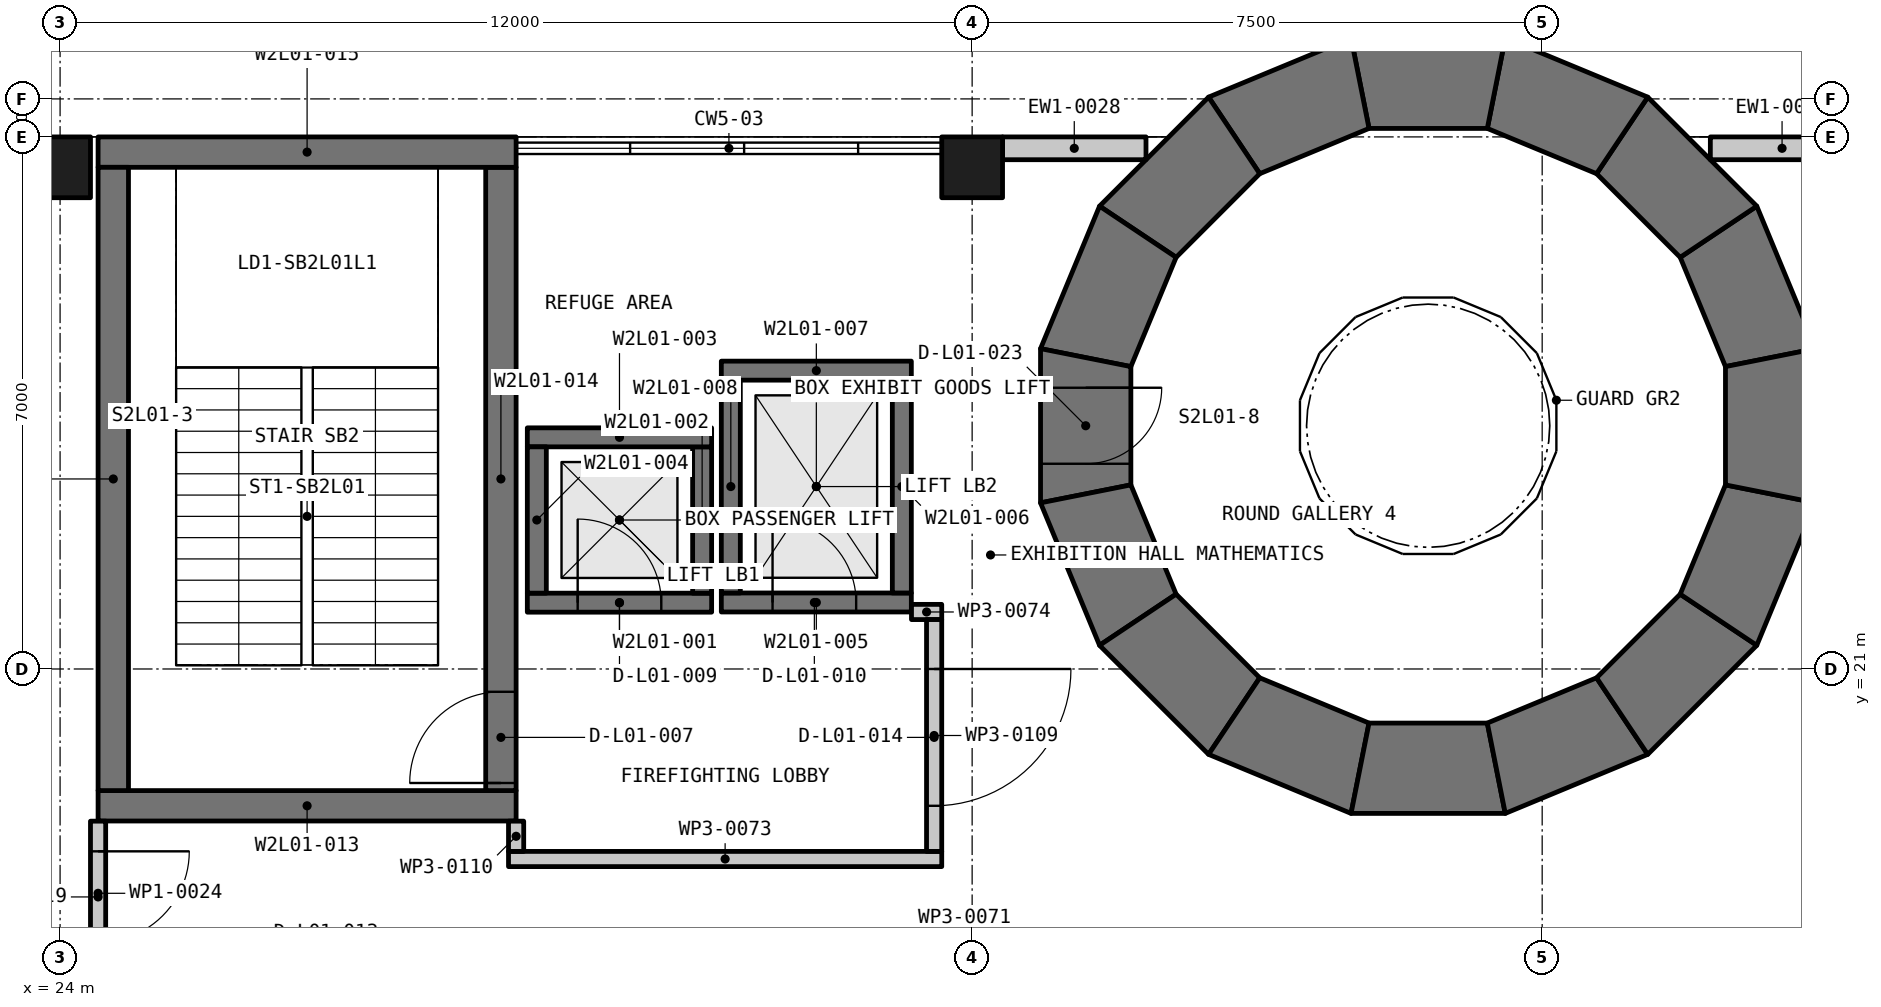
"""IFC4 building model, lengths in metres.
Left out: names, types, materials, properties, quantities, classifications, styles, units other than length and angle.
Written with IfcOpenShell. Run it as: python <this file> out.ifc"""

import sys

from ifc_helpers import new_model, si_unit, direction, frame, frame_2d, origin, origin_2d, place, context, subcontext, project, spatial, polyline, rectangle, outline, extrude, element, fill, save


model = new_model("IFC4")
c1 = context("Model", 3, precision=1e-05, world=origin(), true_north=direction((0.0, 1.0)))
c2 = subcontext(c1, "Body", "Model", "MODEL_VIEW")
j1 = project(units=[si_unit("LENGTHUNIT", "METRE"), si_unit("PLANEANGLEUNIT", "RADIAN")], contexts=[c1])
p1 = place(None, origin())
s1 = spatial("IfcSite", under=j1, at=p1, CompositionType="ELEMENT")
p2 = place(p1, origin())
s2 = spatial("IfcBuilding", under=s1, at=p2, CompositionType="ELEMENT")
p3 = place(p2, frame((0.0, 0.0, 6.0)))
s3 = spatial("IfcBuildingStorey", under=s2, at=p3, CompositionType="ELEMENT", Elevation=6.0)
for number, where, z_axis, x_axis in (
    (1, (24.0, 27.6, -0.3), (0.0, 0.0, 1.0), (1.0, 0.0, 0.0)),
    (2, (36.0, 27.6, -0.3), (0.0, 0.0, 1.0), (1.0, 0.0, 0.0)),
):
    element("IfcColumn", number, at=place(p3, frame(where, z_axis=z_axis, x_axis=x_axis)), inside=s3, PredefinedType="COLUMN", context=c2, shape_type="SweptSolid", body=[
        extrude(rectangle(XDim=0.8, YDim=0.8, at=origin_2d()), origin(), (0.0, 0.0, 1.0), 5.25),
    ])
p4 = place(p3, frame((46.551, 24.987, -0.3), z_axis=(0.0, 0.0, 1.0), x_axis=(-0.382649360562, 0.923893644778, 0.0)))
e3 = element("IfcWall", 3, at=p4, inside=s3, PredefinedType="SHEAR", context=c2, shape_type="SweptSolid", body=[
    extrude(outline(polyline([(0.0, -0.594), (2.029, -0.594), (1.792, 0.594), (0.236, 0.594), (0.0, -0.594)])), origin(), (0.0, 0.0, 1.0), 5.25),
])
p5 = place(p3, frame((45.904, 26.669, -0.3), z_axis=(0.0, 0.0, 1.0), x_axis=(-0.707106781187, 0.707106781187, 0.0)))
e4 = element("IfcWall", 4, at=p5, inside=s3, PredefinedType="SHEAR", context=c2, shape_type="SweptSolid", body=[
    extrude(outline(polyline([(0.0, -0.594), (2.029, -0.594), (1.793, 0.594), (0.237, 0.594), (0.0, -0.594)])), origin(), (0.0, 0.0, 1.0), 5.25),
])
p6 = place(p3, frame((44.662, 27.975, -0.3), z_axis=(0.0, 0.0, 1.0), x_axis=(-0.923893644778, 0.382649360562, 0.0)))
e5 = element("IfcWall", 5, at=p6, inside=s3, PredefinedType="SHEAR", context=c2, shape_type="SweptSolid", body=[
    extrude(outline(polyline([(0.0, -0.594), (2.029, -0.594), (1.793, 0.594), (0.236, 0.594), (0.0, -0.594)])), origin(), (0.0, 0.0, 1.0), 5.25),
])
for number, where, z_axis, x_axis in (
    (6, (43.014, 28.706, -0.3), (0.0, 0.0, 1.0), (-1.0, 0.0, 0.0)),
    (7, (41.213, 28.751, -0.3), (0.0, 0.0, 1.0), (-0.924, -0.383, 0.0)),
):
    element("IfcWall", number, at=place(p3, frame(where, z_axis=z_axis, x_axis=x_axis)), inside=s3, PredefinedType="SHEAR", context=c2, shape_type="SweptSolid", body=[
        extrude(outline(polyline([(0.0, -0.594), (2.029, -0.594), (1.792, 0.594), (0.236, 0.594), (0.0, -0.594)])), origin(), (0.0, 0.0, 1.0), 5.25),
    ])
p7 = place(p3, frame((39.531, 28.104, -0.3), z_axis=(0.0, 0.0, 1.0), x_axis=(-0.707106781187, -0.707106781187, 0.0)))
e8 = element("IfcWall", 8, at=p7, inside=s3, PredefinedType="SHEAR", context=c2, shape_type="SweptSolid", body=[
    extrude(outline(polyline([(0.0, -0.594), (2.029, -0.594), (1.793, 0.594), (0.237, 0.594), (0.0, -0.594)])), origin(), (0.0, 0.0, 1.0), 5.25),
])
p8 = place(p3, frame((38.225, 26.862, -0.3), z_axis=(0.0, 0.0, 1.0), x_axis=(-0.382649360562, -0.923893644778, 0.0)))
e9 = element("IfcWall", 9, at=p8, inside=s3, PredefinedType="SHEAR", context=c2, shape_type="SweptSolid", body=[
    extrude(outline(polyline([(-0.0, -0.594), (2.029, -0.594), (1.793, 0.594), (0.236, 0.594), (-0.0, -0.594)])), origin(), (0.0, 0.0, 1.0), 5.25),
])
p9 = place(p3, frame((37.494, 25.214, -0.3), z_axis=(0.0, 0.0, 1.0), x_axis=(0.0, -1.0, 0.0)))
e10 = element("IfcWall", 10, at=p9, inside=s3, PredefinedType="SHEAR", context=c2, shape_type="SweptSolid", body=[
    extrude(outline(polyline([(-0.0, -0.594), (2.029, -0.594), (1.792, 0.594), (0.236, 0.594), (-0.0, -0.594)])), origin(), (0.0, 0.0, 1.0), 5.25),
])
p10 = place(p9, frame((0.514, 0.0, 0.3)))
e11 = element("IfcOpeningElement", 11, at=p10, cuts=e10, PredefinedType="OPENING", context=c2, shape_type="SweptSolid", body=[
    extrude(rectangle(XDim=1.0, YDim=2.2, at=frame_2d((0.5, 1.1))), frame((0.0, 0.604, 0.0), z_axis=(0.0, -1.0, 0.0), x_axis=(1.0, 0.0, 0.0)), (0.0, 0.0, 1.0), 1.208),
])
p11 = place(p3, frame((37.449, 23.413, -0.3), z_axis=(0.0, 0.0, 1.0), x_axis=(0.382649360562, -0.923893644778, 0.0)))
e12 = element("IfcWall", 12, at=p11, inside=s3, PredefinedType="SHEAR", context=c2, shape_type="SweptSolid", body=[
    extrude(outline(polyline([(0.0, -0.594), (2.029, -0.594), (1.792, 0.594), (0.236, 0.594), (0.0, -0.594)])), origin(), (0.0, 0.0, 1.0), 5.25),
])
p12 = place(p3, frame((38.096, 21.731, -0.3), z_axis=(0.0, 0.0, 1.0), x_axis=(0.707166942566, -0.707046614688, 0.0)))
e13 = element("IfcWall", 13, at=p12, inside=s3, PredefinedType="SHEAR", context=c2, shape_type="SweptSolid", body=[
    extrude(outline(polyline([(0.0, -0.594), (2.029, -0.594), (1.793, 0.594), (0.237, 0.594), (0.0, -0.594)])), origin(), (0.0, 0.0, 1.0), 5.25),
])
p13 = place(p3, frame((39.338, 20.425, -0.3), z_axis=(0.0, 0.0, 1.0), x_axis=(0.923893644778, -0.382649360562, 0.0)))
e14 = element("IfcWall", 14, at=p13, inside=s3, PredefinedType="SHEAR", context=c2, shape_type="SweptSolid", body=[
    extrude(outline(polyline([(0.0, -0.594), (2.029, -0.594), (1.793, 0.594), (0.236, 0.594), (0.0, -0.594)])), origin(), (0.0, 0.0, 1.0), 5.25),
])
p14 = place(p3, frame((40.986, 19.694, -0.3), z_axis=(0.0, 0.0, 1.0), x_axis=(1.0, 0.0, 0.0)))
e15 = element("IfcWall", 15, at=p14, inside=s3, PredefinedType="SHEAR", context=c2, shape_type="SweptSolid", body=[
    extrude(outline(polyline([(0.0, -0.594), (2.029, -0.594), (1.792, 0.594), (0.236, 0.594), (0.0, -0.594)])), origin(), (0.0, 0.0, 1.0), 5.25),
])
p15 = place(p3, frame((42.787, 19.649, -0.3), z_axis=(0.0, 0.0, 1.0), x_axis=(0.923893644778, 0.382649360562, 0.0)))
e16 = element("IfcWall", 16, at=p15, inside=s3, PredefinedType="SHEAR", context=c2, shape_type="SweptSolid", body=[
    extrude(outline(polyline([(0.0, -0.594), (2.029, -0.594), (1.792, 0.594), (0.236, 0.594), (0.0, -0.594)])), origin(), (0.0, 0.0, 1.0), 5.25),
])
p16 = place(p3, frame((44.469, 20.297, -0.3), z_axis=(0.0, 0.0, 1.0), x_axis=(0.707166942566, 0.707046614688, 0.0)))
e17 = element("IfcWall", 17, at=p16, inside=s3, PredefinedType="SHEAR", context=c2, shape_type="SweptSolid", body=[
    extrude(outline(polyline([(0.0, -0.594), (2.029, -0.594), (1.792, 0.594), (0.236, 0.594), (0.0, -0.594)])), origin(), (0.0, 0.0, 1.0), 5.25),
])
p17 = place(p3, frame((45.775, 21.538, -0.3), z_axis=(0.0, 0.0, 1.0), x_axis=(0.382649360562, 0.923893644778, 0.0)))
e18 = element("IfcWall", 18, at=p17, inside=s3, PredefinedType="SHEAR", context=c2, shape_type="SweptSolid", body=[
    extrude(outline(polyline([(0.0, -0.594), (2.029, -0.594), (1.793, 0.594), (0.236, 0.594), (0.0, -0.594)])), origin(), (0.0, 0.0, 1.0), 5.25),
])
p18 = place(p3, frame((46.506, 23.186, -0.3), z_axis=(0.0, 0.0, 1.0), x_axis=(0.0, 1.0, 0.0)))
e19 = element("IfcWall", 19, at=p18, inside=s3, PredefinedType="SHEAR", context=c2, shape_type="SweptSolid", body=[
    extrude(outline(polyline([(0.0, -0.594), (2.029, -0.594), (1.792, 0.594), (0.236, 0.594), (0.0, -0.594)])), origin(), (0.0, 0.0, 1.0), 5.25),
])
p19 = place(p3, frame((30.147, 21.873, -0.3), z_axis=(0.0, 0.0, 1.0), x_axis=(1.0, 0.0, 0.0)))
e20 = element("IfcWall", 20, at=p19, inside=s3, PredefinedType="SHEAR", context=c2, shape_type="SweptSolid", body=[
    extrude(rectangle(XDim=2.425, YDim=0.25, at=frame_2d((1.212, 0.0))), origin(), (0.0, 0.0, 1.0), 5.25),
])
p20 = place(p19, frame((0.663, 0.0, 0.3)))
e21 = element("IfcOpeningElement", 21, at=p20, cuts=e20, PredefinedType="OPENING", context=c2, shape_type="SweptSolid", body=[
    extrude(rectangle(XDim=1.1, YDim=2.1, at=frame_2d((0.55, 1.05))), frame((0.0, 0.135, 0.0), z_axis=(0.0, -1.0, 0.0), x_axis=(1.0, 0.0, 0.0)), (0.0, 0.0, 1.0), 0.27),
])
p21 = place(p3, frame((32.448, 21.998, -0.3), z_axis=(0.0, 0.0, 1.0), x_axis=(0.0, 1.0, 0.0)))
e22 = element("IfcWall", 22, at=p21, inside=s3, PredefinedType="SHEAR", context=c2, shape_type="SweptSolid", body=[
    extrude(rectangle(XDim=1.925, YDim=0.25, at=frame_2d((0.962, 0.0))), origin(), (0.0, 0.0, 1.0), 5.25),
])
p22 = place(p3, frame((30.147, 24.048, -0.3), z_axis=(0.0, 0.0, 1.0), x_axis=(1.0, 0.0, 0.0)))
e23 = element("IfcWall", 23, at=p22, inside=s3, PredefinedType="SHEAR", context=c2, shape_type="SweptSolid", body=[
    extrude(rectangle(XDim=2.425, YDim=0.25, at=frame_2d((1.212, 0.0))), origin(), (0.0, 0.0, 1.0), 5.25),
])
p23 = place(p3, frame((30.272, 21.998, -0.3), z_axis=(0.0, 0.0, 1.0), x_axis=(0.0, 1.0, 0.0)))
e24 = element("IfcWall", 24, at=p23, inside=s3, PredefinedType="SHEAR", context=c2, shape_type="SweptSolid", body=[
    extrude(rectangle(XDim=1.925, YDim=0.25, at=frame_2d((0.962, 0.0))), origin(), (0.0, 0.0, 1.0), 5.25),
])
p24 = place(p3, frame((32.7, 21.875, -0.3), z_axis=(0.0, 0.0, 1.0), x_axis=(1.0, 0.0, 0.0)))
e25 = element("IfcWall", 25, at=p24, inside=s3, PredefinedType="SHEAR", context=c2, shape_type="SweptSolid", body=[
    extrude(rectangle(XDim=2.5, YDim=0.25, at=frame_2d((1.25, 0.0))), origin(), (0.0, 0.0, 1.0), 5.25),
])
p25 = place(p24, frame((0.674, 0.0, 0.3)))
e26 = element("IfcOpeningElement", 26, at=p25, cuts=e25, PredefinedType="OPENING", context=c2, shape_type="SweptSolid", body=[
    extrude(rectangle(XDim=1.1, YDim=2.1, at=frame_2d((0.55, 1.05))), frame((0.0, 0.135, 0.0), z_axis=(0.0, -1.0, 0.0), x_axis=(1.0, 0.0, 0.0)), (0.0, 0.0, 1.0), 0.27),
])
p26 = place(p3, frame((35.075, 22.0, -0.3), z_axis=(0.0, 0.0, 1.0), x_axis=(0.0, 1.0, 0.0)))
e27 = element("IfcWall", 27, at=p26, inside=s3, PredefinedType="SHEAR", context=c2, shape_type="SweptSolid", body=[
    extrude(rectangle(XDim=2.8, YDim=0.25, at=frame_2d((1.4, 0.0))), origin(), (0.0, 0.0, 1.0), 5.25),
])
p27 = place(p3, frame((32.7, 24.925, -0.3), z_axis=(0.0, 0.0, 1.0), x_axis=(1.0, 0.0, 0.0)))
e28 = element("IfcWall", 28, at=p27, inside=s3, PredefinedType="SHEAR", context=c2, shape_type="SweptSolid", body=[
    extrude(rectangle(XDim=2.5, YDim=0.25, at=frame_2d((1.25, 0.0))), origin(), (0.0, 0.0, 1.0), 5.25),
])
p28 = place(p3, frame((32.825, 22.0, -0.3), z_axis=(0.0, 0.0, 1.0), x_axis=(0.0, 1.0, 0.0)))
e29 = element("IfcWall", 29, at=p28, inside=s3, PredefinedType="SHEAR", context=c2, shape_type="SweptSolid", body=[
    extrude(rectangle(XDim=2.8, YDim=0.25, at=frame_2d((1.4, 0.0))), origin(), (0.0, 0.0, 1.0), 5.25),
])
p29 = place(p3, frame((24.5, 19.2, -0.3), z_axis=(0.0, 0.0, 1.0), x_axis=(1.0, 0.0, 0.0)))
e30 = element("IfcWall", 30, at=p29, inside=s3, PredefinedType="SHEAR", context=c2, shape_type="SweptSolid", body=[
    extrude(rectangle(XDim=5.5, YDim=0.4, at=frame_2d((2.75, 0.0))), origin(), (0.0, 0.0, 1.0), 5.25),
])
p30 = place(p3, frame((29.8, 19.4, -0.3), z_axis=(0.0, 0.0, 1.0), x_axis=(0.0, 1.0, 0.0)))
e31 = element("IfcWall", 31, at=p30, inside=s3, PredefinedType="SHEAR", context=c2, shape_type="SweptSolid", body=[
    extrude(rectangle(XDim=8.2, YDim=0.4, at=frame_2d((4.1, 0.0))), origin(), (0.0, 0.0, 1.0), 5.25),
])
p31 = place(p30, frame((0.1, 0.0, 0.3)))
e32 = element("IfcOpeningElement", 32, at=p31, cuts=e31, PredefinedType="OPENING", context=c2, shape_type="SweptSolid", body=[
    extrude(rectangle(XDim=1.2, YDim=2.2, at=frame_2d((0.6, 1.1))), frame((0.0, 0.21, 0.0), z_axis=(0.0, -1.0, 0.0), x_axis=(1.0, 0.0, 0.0)), (0.0, 0.0, 1.0), 0.42),
])
p32 = place(p3, frame((24.5, 27.8, -0.3), z_axis=(0.0, 0.0, 1.0), x_axis=(1.0, 0.0, 0.0)))
e33 = element("IfcWall", 33, at=p32, inside=s3, PredefinedType="SHEAR", context=c2, shape_type="SweptSolid", body=[
    extrude(rectangle(XDim=5.5, YDim=0.4, at=frame_2d((2.75, 0.0))), origin(), (0.0, 0.0, 1.0), 5.25),
])
p33 = place(p3, frame((24.7, 19.4, -0.3), z_axis=(0.0, 0.0, 1.0), x_axis=(0.0, 1.0, 0.0)))
e34 = element("IfcWall", 34, at=p33, inside=s3, PredefinedType="SHEAR", context=c2, shape_type="SweptSolid", body=[
    extrude(rectangle(XDim=8.2, YDim=0.4, at=frame_2d((4.1, 0.0))), origin(), (0.0, 0.0, 1.0), 5.25),
])
for number, where, z_axis, x_axis in (
    (35, (36.4, 27.85, 0.0), (0.0, 0.0, 1.0), (1.0, 0.0, 0.0)),
    (36, (45.713, 27.85, 0.0), (0.0, 0.0, 1.0), (1.0, 0.0, 0.0)),
):
    element("IfcWall", number, at=place(p3, frame(where, z_axis=z_axis, x_axis=x_axis)), inside=s3, PredefinedType="SOLIDWALL", context=c2, shape_type="SweptSolid", body=[
        extrude(rectangle(XDim=1.887, YDim=0.3, at=frame_2d((0.944, 0.0))), origin(), (0.0, 0.0, 1.0), 4.05),
    ])
p34 = place(p3, frame((29.9, 18.5, 0.0), z_axis=(0.0, 0.0, 1.0), x_axis=(1.0, 0.0, 0.0)))
e37 = element("IfcWall", 37, at=p34, inside=s3, PredefinedType="PARTITIONING", context=c2, shape_type="SweptSolid", body=[
    extrude(rectangle(XDim=5.7, YDim=0.2, at=frame_2d((2.85, 0.0))), origin(), (0.0, 0.0, 1.0), 4.25),
])
p35 = place(p3, frame((35.202, 21.75, 0.0), z_axis=(0.0, 0.0, 1.0), x_axis=(1.0, 0.0, 0.0)))
e38 = element("IfcWall", 38, at=p35, inside=s3, PredefinedType="PARTITIONING", context=c2, shape_type="SweptSolid", body=[
    extrude(rectangle(XDim=0.398, YDim=0.2, at=frame_2d((0.199, 0.0))), origin(), (0.0, 0.0, 1.0), 4.95),
])
p36 = place(p3, frame((35.5, 21.65, 0.0), z_axis=(0.0, 0.0, 1.0), x_axis=(0.0, -1.0, 0.0)))
e39 = element("IfcWall", 39, at=p36, inside=s3, PredefinedType="PARTITIONING", context=c2, shape_type="SweptSolid", body=[
    extrude(rectangle(XDim=3.05, YDim=0.2, at=frame_2d((1.525, 0.0))), origin(), (0.0, 0.0, 1.0), 4.95),
])
p37 = place(p36, frame((0.65, 0.0, 0.0)))
e40 = element("IfcOpeningElement", 40, at=p37, cuts=e39, PredefinedType="OPENING", context=c2, shape_type="SweptSolid", body=[
    extrude(rectangle(XDim=1.8, YDim=2.1, at=frame_2d((0.9, 1.05))), frame((0.0, 0.11, 0.0), z_axis=(0.0, -1.0, 0.0), x_axis=(1.0, 0.0, 0.0)), (0.0, 0.0, 1.0), 0.22),
])
p38 = place(p3, frame((30.0, 18.6, 0.0), z_axis=(0.0, 0.0, 1.0), x_axis=(0.0, 1.0, 0.0)))
e41 = element("IfcWall", 41, at=p38, inside=s3, PredefinedType="PARTITIONING", context=c2, shape_type="SweptSolid", body=[
    extrude(rectangle(XDim=0.398, YDim=0.2, at=frame_2d((0.199, 0.0))), origin(), (0.0, 0.0, 1.0), 4.95),
])
p39 = place(p3, frame((24.5, 18.998, 0.0), z_axis=(0.0, 0.0, 1.0), x_axis=(0.0, -1.0, 0.0)))
e42 = element("IfcWall", 42, at=p39, inside=s3, PredefinedType="PARTITIONING", context=c2, shape_type="SweptSolid", body=[
    extrude(rectangle(XDim=1.898, YDim=0.2, at=frame_2d((0.949, 0.0))), origin(), (0.0, 0.0, 1.0), 4.05),
])
p40 = place(p39, frame((0.397, 0.0, 0.0)))
e43 = element("IfcOpeningElement", 43, at=p40, cuts=e42, PredefinedType="OPENING", context=c2, shape_type="SweptSolid", body=[
    extrude(rectangle(XDim=1.2, YDim=2.1, at=frame_2d((0.6, 1.05))), frame((0.0, 0.11, 0.0), z_axis=(0.0, -1.0, 0.0), x_axis=(1.0, 0.0, 0.0)), (0.0, 0.0, 1.0), 0.22),
])
p41 = place(p31, origin())
e44 = element("IfcDoor", 44, at=p41, inside=s3, OperationType="SINGLE_SWING_RIGHT", PredefinedType="DOOR", context=c2, shape_type="SweptSolid", body=[
    extrude(rectangle(XDim=1.2, YDim=2.2, at=frame_2d((0.6, 1.1))), frame((0.0, 0.025, 0.0), z_axis=(0.0, -1.0, 0.0), x_axis=(1.0, 0.0, 0.0)), (0.0, 0.0, 1.0), 0.05),
])
fill(e32, e44)
p42 = place(p20, origin())
e45 = element("IfcDoor", 45, at=p42, inside=s3, OperationType="DOUBLE_DOOR_SLIDING", PredefinedType="DOOR", context=c2, shape_type="SweptSolid", body=[
    extrude(rectangle(XDim=1.1, YDim=2.1, at=frame_2d((0.55, 1.05))), frame((0.0, 0.025, 0.0), z_axis=(0.0, -1.0, 0.0), x_axis=(1.0, 0.0, 0.0)), (0.0, 0.0, 1.0), 0.05),
])
fill(e21, e45)
p43 = place(p25, origin())
e46 = element("IfcDoor", 46, at=p43, inside=s3, OperationType="DOUBLE_DOOR_SLIDING", PredefinedType="DOOR", context=c2, shape_type="SweptSolid", body=[
    extrude(rectangle(XDim=1.1, YDim=2.1, at=frame_2d((0.55, 1.05))), frame((0.0, 0.025, 0.0), z_axis=(0.0, -1.0, 0.0), x_axis=(1.0, 0.0, 0.0)), (0.0, 0.0, 1.0), 0.05),
])
fill(e26, e46)
p44 = place(p37, origin())
e47 = element("IfcDoor", 47, at=p44, inside=s3, OperationType="DOUBLE_DOOR_SINGLE_SWING", PredefinedType="DOOR", context=c2, shape_type="SweptSolid", body=[
    extrude(rectangle(XDim=1.8, YDim=2.1, at=frame_2d((0.9, 1.05))), frame((0.0, 0.025, 0.0), z_axis=(0.0, -1.0, 0.0), x_axis=(1.0, 0.0, 0.0)), (0.0, 0.0, 1.0), 0.05),
])
fill(e40, e47)
p45 = place(p40, origin())
e48 = element("IfcDoor", 48, at=p45, inside=s3, OperationType="SINGLE_SWING_LEFT", PredefinedType="DOOR", context=c2, shape_type="SweptSolid", body=[
    extrude(rectangle(XDim=1.2, YDim=2.1, at=frame_2d((0.6, 1.05))), frame((0.0, 0.025, 0.0), z_axis=(0.0, -1.0, 0.0), x_axis=(1.0, 0.0, 0.0)), (0.0, 0.0, 1.0), 0.05),
])
fill(e43, e48)
p46 = place(p10, origin())
e49 = element("IfcDoor", 49, at=p46, inside=s3, OperationType="SINGLE_SWING_LEFT", PredefinedType="DOOR", context=c2, shape_type="SweptSolid", body=[
    extrude(rectangle(XDim=1.0, YDim=2.2, at=frame_2d((0.5, 1.1))), frame((0.0, 0.025, 0.0), z_axis=(0.0, -1.0, 0.0), x_axis=(1.0, 0.0, 0.0)), (0.0, 0.0, 1.0), 0.05),
])
fill(e11, e49)
save(model, sys.argv[1])
